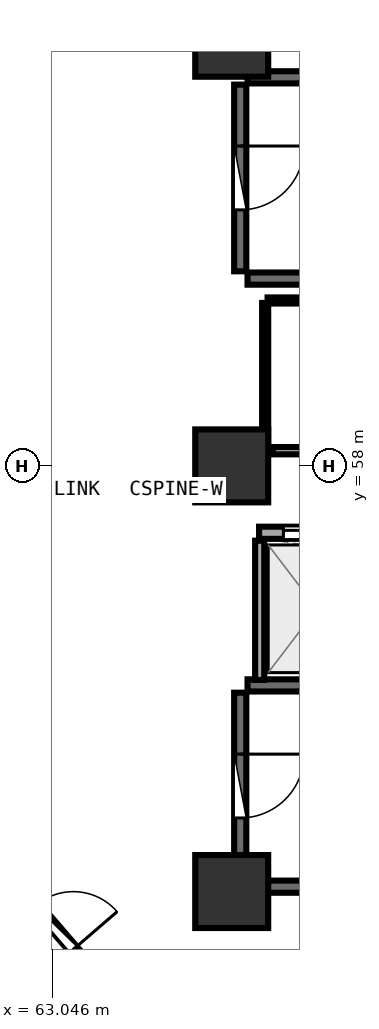
"""IFC4 building model, lengths in metres.
Left out: names, types, materials, properties, quantities, classifications, styles, units other than length and angle.
Written with IfcOpenShell. Run it as: python <this file> out.ifc"""

import sys

from ifc_helpers import new_model, si_unit, direction, frame, frame_2d, origin, origin_2d, place, context, subcontext, project, spatial, rectangle, extrude, element, fill, save


model = new_model("IFC4")
c1 = context("Model", 3, precision=1e-05, world=origin(), true_north=direction((0.0, 1.0)))
c2 = subcontext(c1, "Body", "Model", "MODEL_VIEW")
j1 = project(units=[si_unit("LENGTHUNIT", "METRE"), si_unit("PLANEANGLEUNIT", "RADIAN")], contexts=[c1])
p1 = place(None, origin())
s1 = spatial("IfcSite", under=j1, at=p1, CompositionType="ELEMENT")
p2 = place(p1, origin())
s2 = spatial("IfcBuilding", under=s1, at=p2, CompositionType="ELEMENT")
p3 = place(p2, frame((0.0, 0.0, 173.1)))
s3 = spatial("IfcBuildingStorey", under=s2, at=p3, CompositionType="ELEMENT", Elevation=173.1)
for number, where, z_axis, x_axis in (
    (1, (66.0, 51.0, 0.0), (0.0, 0.0, 1.0), (1.0, 0.0, 0.0)),
    (2, (66.0, 65.0, 0.0), (0.0, 0.0, 1.0), (1.0, 0.0, 0.0)),
    (3, (66.0, 58.0, 0.0), (0.0, 0.0, 1.0), (1.0, 0.0, 0.0)),
):
    element("IfcColumn", number, at=place(p3, frame(where, z_axis=z_axis, x_axis=x_axis)), inside=s3, PredefinedType="PILASTER", context=c2, shape_type="SweptSolid", body=[
        extrude(rectangle(XDim=1.2, YDim=1.2, at=origin_2d()), origin(), (0.0, 0.0, 1.0), 3.75),
    ])
for number, where, z_axis, x_axis in (
    (4, (66.26, 61.08, 0.0), (0.0, 0.0, 1.0), (1.0, 0.0, 0.0)),
    (5, (73.42, 64.39, 0.0), (0.0, 0.0, 1.0), (-1.0, 0.0, 0.0)),
):
    element("IfcWall", number, at=place(p3, frame(where, z_axis=z_axis, x_axis=x_axis)), inside=s3, PredefinedType="SHEAR", context=c2, shape_type="SweptSolid", body=[
        extrude(rectangle(XDim=7.16, YDim=0.2, at=frame_2d((3.58, 0.0))), origin(), (0.0, 0.0, 1.0), 3.49),
    ])
p4 = place(p3, frame((66.14, 64.27, 0.0), z_axis=(0.0, 0.0, 1.0), x_axis=(0.0, -1.0, 0.0)))
e6 = element("IfcWall", 6, at=p4, inside=s3, PredefinedType="SHEAR", context=c2, shape_type="SweptSolid", body=[
    extrude(rectangle(XDim=3.07, YDim=0.2, at=frame_2d((1.535, 0.0))), origin(), (0.0, 0.0, 1.0), 3.49),
])
p5 = place(p4, frame((1.01, 0.0, 0.0)))
e7 = element("IfcOpeningElement", 7, at=p5, cuts=e6, PredefinedType="OPENING", context=c2, shape_type="SweptSolid", body=[
    extrude(rectangle(XDim=1.05, YDim=2.1, at=frame_2d((0.525, 1.05))), frame((0.0, 0.11, 0.0), z_axis=(0.0, -1.0, 0.0), x_axis=(1.0, 0.0, 0.0)), (0.0, 0.0, 1.0), 0.22),
])
for number, where, z_axis, x_axis in (
    (8, (66.26, 51.08, 0.0), (0.0, 0.0, 1.0), (1.0, 0.0, 0.0)),
    (9, (73.42, 54.39, 0.0), (0.0, 0.0, 1.0), (-1.0, 0.0, 0.0)),
):
    element("IfcWall", number, at=place(p3, frame(where, z_axis=z_axis, x_axis=x_axis)), inside=s3, PredefinedType="SHEAR", context=c2, shape_type="SweptSolid", body=[
        extrude(rectangle(XDim=7.16, YDim=0.2, at=frame_2d((3.58, 0.0))), origin(), (0.0, 0.0, 1.0), 3.49),
    ])
p6 = place(p3, frame((66.14, 54.27, 0.0), z_axis=(0.0, 0.0, 1.0), x_axis=(0.0, -1.0, 0.0)))
e10 = element("IfcWall", 10, at=p6, inside=s3, PredefinedType="SHEAR", context=c2, shape_type="SweptSolid", body=[
    extrude(rectangle(XDim=3.07, YDim=0.2, at=frame_2d((1.535, 0.0))), origin(), (0.0, 0.0, 1.0), 3.49),
])
p7 = place(p6, frame((1.01, 0.0, 0.0)))
e11 = element("IfcOpeningElement", 11, at=p7, cuts=e10, PredefinedType="OPENING", context=c2, shape_type="SweptSolid", body=[
    extrude(rectangle(XDim=1.05, YDim=2.1, at=frame_2d((0.525, 1.05))), frame((0.0, 0.11, 0.0), z_axis=(0.0, -1.0, 0.0), x_axis=(1.0, 0.0, 0.0)), (0.0, 0.0, 1.0), 0.22),
])
p8 = place(p3, frame((66.45, 56.9, 0.0), z_axis=(0.0, 0.0, 1.0), x_axis=(1.0, 0.0, 0.0)))
e12 = element("IfcWall", 12, at=p8, inside=s3, PredefinedType="SOLIDWALL", context=c2, shape_type="SweptSolid", body=[
    extrude(rectangle(XDim=14.4, YDim=0.2, at=frame_2d((7.2, 0.0))), origin(), (0.0, 0.0, 1.0), 3.48),
])
p9 = place(p8, frame((0.4, 0.0, 0.0)))
e13 = element("IfcOpeningElement", 13, at=p9, cuts=e12, PredefinedType="OPENING", context=c2, shape_type="SweptSolid", body=[
    extrude(rectangle(XDim=1.1, YDim=2.1, at=frame_2d((0.55, 1.05))), frame((0.0, 0.11, 0.0), z_axis=(0.0, -1.0, 0.0), x_axis=(1.0, 0.0, 0.0)), (0.0, 0.0, 1.0), 0.22),
])
p10 = place(p8, frame((2.4, 0.0, 0.0)))
e14 = element("IfcOpeningElement", 14, at=p10, cuts=e12, PredefinedType="OPENING", context=c2, shape_type="SweptSolid", body=[
    extrude(rectangle(XDim=1.1, YDim=2.1, at=frame_2d((0.55, 1.05))), frame((0.0, 0.11, 0.0), z_axis=(0.0, -1.0, 0.0), x_axis=(1.0, 0.0, 0.0)), (0.0, 0.0, 1.0), 0.22),
])
p11 = place(p8, frame((4.4, 0.0, 0.0)))
e15 = element("IfcOpeningElement", 15, at=p11, cuts=e12, PredefinedType="OPENING", context=c2, shape_type="SweptSolid", body=[
    extrude(rectangle(XDim=1.1, YDim=2.1, at=frame_2d((0.55, 1.05))), frame((0.0, 0.11, 0.0), z_axis=(0.0, -1.0, 0.0), x_axis=(1.0, 0.0, 0.0)), (0.0, 0.0, 1.0), 0.22),
])
p12 = place(p3, frame((66.46, 54.48, 0.0), z_axis=(0.0, 0.0, 1.0), x_axis=(0.0, 1.0, 0.0)))
e16 = element("IfcWall", 16, at=p12, inside=s3, PredefinedType="PARTITIONING", context=c2, shape_type="SweptSolid", body=[
    extrude(rectangle(XDim=2.29, YDim=0.15, at=frame_2d((1.145, 0.0))), origin(), (0.0, 0.0, 1.0), 3.48),
])
p13 = place(p3, frame((66.675, 58.25, 0.0), z_axis=(0.0, 0.0, 1.0), x_axis=(1.0, 0.0, 0.0)))
e17 = element("IfcWall", 17, at=p13, inside=s3, PredefinedType="PARTITIONING", context=c2, shape_type="SweptSolid", body=[
    extrude(rectangle(XDim=5.715, YDim=0.12, at=frame_2d((2.857, 0.0))), origin(), (0.0, 0.0, 1.0), 3.48),
])
p14 = place(p13, frame((2.407, 0.0, 0.0)))
e18 = element("IfcOpeningElement", 18, at=p14, cuts=e17, PredefinedType="OPENING", context=c2, shape_type="SweptSolid", body=[
    extrude(rectangle(XDim=0.9, YDim=2.08, at=frame_2d((0.45, 1.04))), frame((0.0, 0.07, 0.0), z_axis=(0.0, -1.0, 0.0), x_axis=(1.0, 0.0, 0.0)), (0.0, 0.0, 1.0), 0.14),
])
p15 = place(p3, frame((62.577, 50.999, 0.0), z_axis=(0.0, 0.0, 1.0), x_axis=(0.652725635782, -0.757594379859, 0.0)))
e19 = element("IfcWall", 19, at=p15, inside=s3, PredefinedType="PARTITIONING", context=c2, shape_type="SweptSolid", body=[
    extrude(rectangle(XDim=1.557, YDim=0.15, at=frame_2d((0.779, 0.0))), origin(), (0.0, 0.0, 1.0), 2.975),
])
p16 = place(p15, frame((0.304, 0.0, 0.0)))
e20 = element("IfcOpeningElement", 20, at=p16, cuts=e19, PredefinedType="OPENING", context=c2, shape_type="SweptSolid", body=[
    extrude(rectangle(XDim=0.95, YDim=2.08, at=frame_2d((0.475, 1.04))), frame((0.0, 0.085, 0.0), z_axis=(0.0, -1.0, 0.0), x_axis=(1.0, 0.0, 0.0)), (0.0, 0.0, 1.0), 0.17),
])
p17 = place(p3, frame((72.41, 60.72, 0.0), z_axis=(0.0, 0.0, 1.0), x_axis=(-1.0, 0.0, 0.0)))
e21 = element("IfcWall", 21, at=p17, inside=s3, PredefinedType="PARTITIONING", context=c2, shape_type="SweptSolid", body=[
    extrude(rectangle(XDim=5.82, YDim=0.1, at=frame_2d((2.91, 0.0))), origin(), (0.0, 0.0, 1.0), 3.48),
])
p18 = place(p3, frame((66.55, 60.68, 0.0), z_axis=(0.0, 0.0, 1.0), x_axis=(0.0, -1.0, 0.0)))
e22 = element("IfcWall", 22, at=p18, inside=s3, PredefinedType="PARTITIONING", context=c2, shape_type="SweptSolid", body=[
    extrude(rectangle(XDim=2.383, YDim=0.1, at=frame_2d((1.191, 0.0))), origin(), (0.0, 0.0, 1.0), 3.48),
])
p19 = place(p5, origin())
e23 = element("IfcDoor", 23, at=p19, inside=s3, OperationType="SINGLE_SWING_LEFT", PredefinedType="DOOR", context=c2, shape_type="SweptSolid", body=[
    extrude(rectangle(XDim=1.05, YDim=2.1, at=frame_2d((0.525, 1.05))), frame((0.0, 0.025, 0.0), z_axis=(0.0, -1.0, 0.0), x_axis=(1.0, 0.0, 0.0)), (0.0, 0.0, 1.0), 0.05),
])
fill(e7, e23)
p20 = place(p7, origin())
e24 = element("IfcDoor", 24, at=p20, inside=s3, OperationType="SINGLE_SWING_LEFT", PredefinedType="DOOR", context=c2, shape_type="SweptSolid", body=[
    extrude(rectangle(XDim=1.05, YDim=2.1, at=frame_2d((0.525, 1.05))), frame((0.0, 0.025, 0.0), z_axis=(0.0, -1.0, 0.0), x_axis=(1.0, 0.0, 0.0)), (0.0, 0.0, 1.0), 0.05),
])
fill(e11, e24)
p21 = place(p9, origin())
e25 = element("IfcDoor", 25, at=p21, inside=s3, OperationType="DOUBLE_DOOR_SLIDING", PredefinedType="DOOR", context=c2, shape_type="SweptSolid", body=[
    extrude(rectangle(XDim=1.1, YDim=2.1, at=frame_2d((0.55, 1.05))), frame((0.0, 0.025, 0.0), z_axis=(0.0, -1.0, 0.0), x_axis=(1.0, 0.0, 0.0)), (0.0, 0.0, 1.0), 0.05),
])
fill(e13, e25)
p22 = place(p16, origin())
e26 = element("IfcDoor", 26, at=p22, inside=s3, OperationType="SINGLE_SWING_RIGHT", PredefinedType="DOOR", context=c2, shape_type="SweptSolid", body=[
    extrude(rectangle(XDim=0.95, YDim=2.08, at=frame_2d((0.475, 1.04))), frame((0.0, 0.025, 0.0), z_axis=(0.0, -1.0, 0.0), x_axis=(1.0, 0.0, 0.0)), (0.0, 0.0, 1.0), 0.05),
])
fill(e20, e26)
save(model, sys.argv[1])
